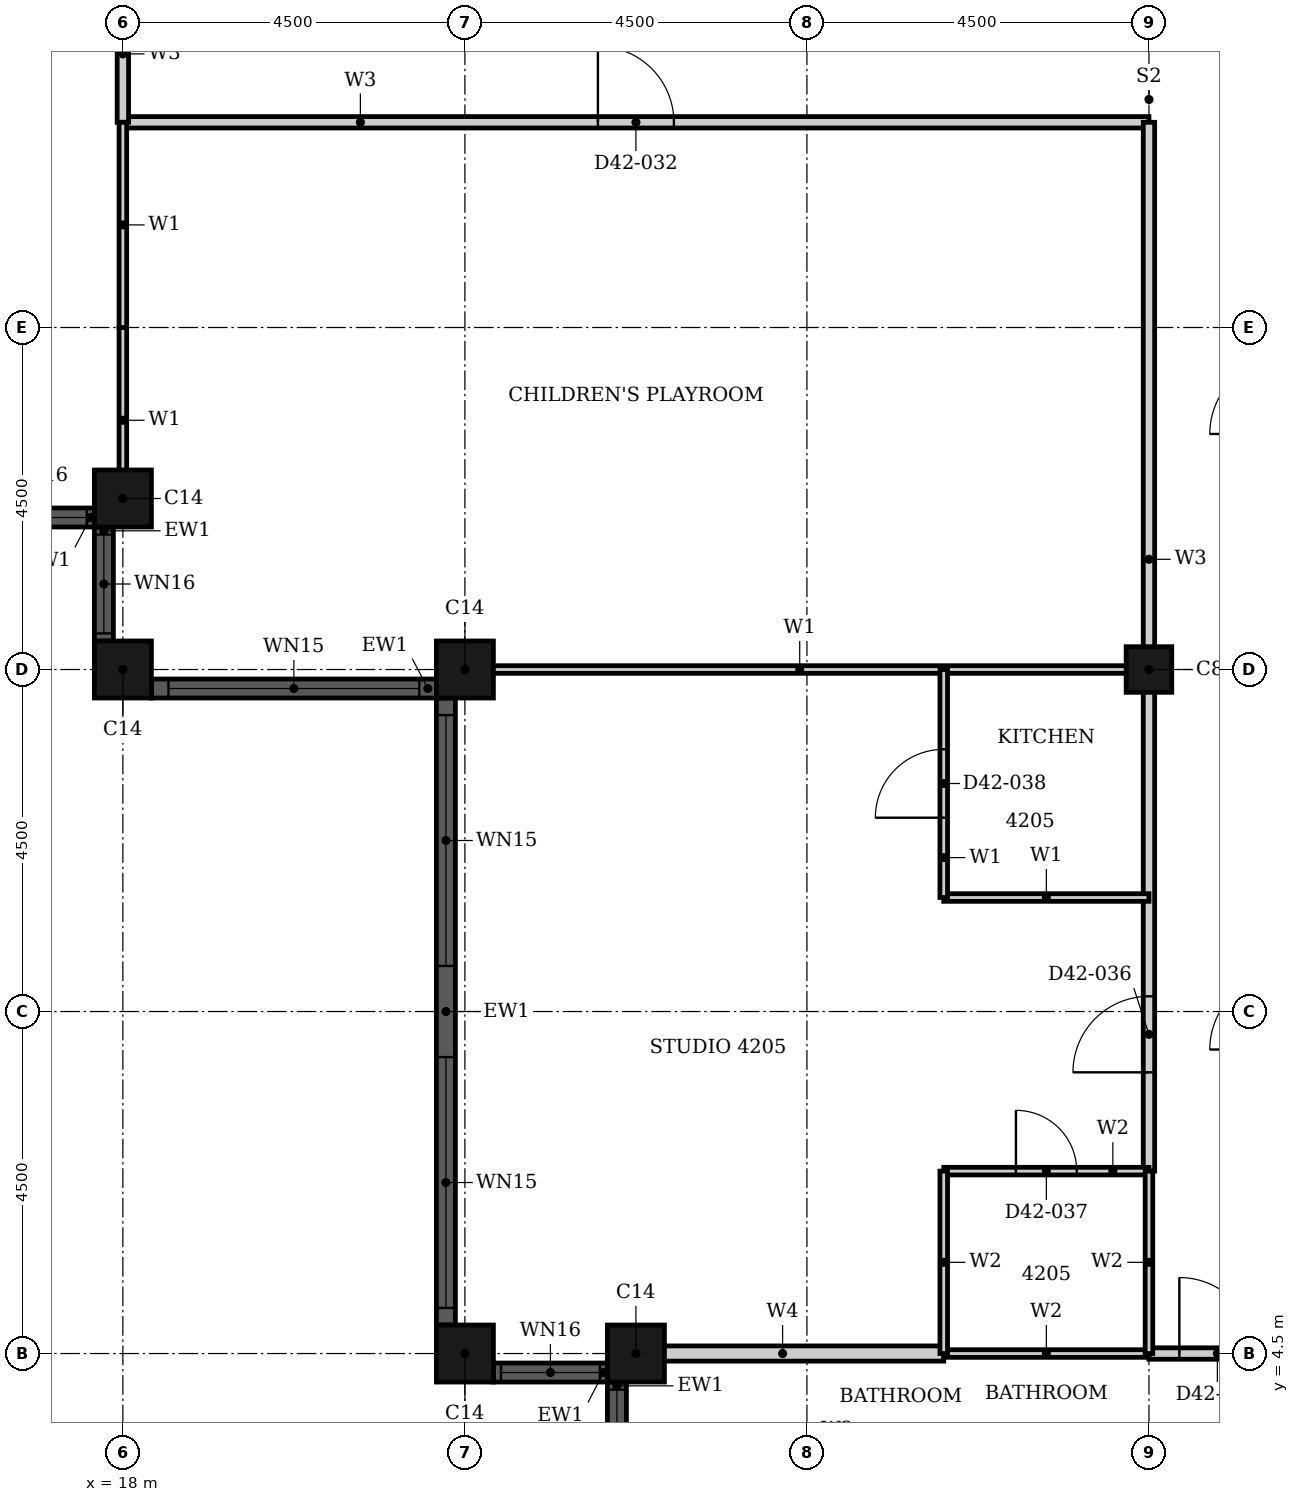
"""IFC4 building model, lengths in metres.
Left out: names, types, materials, properties, quantities, classifications, styles, units other than length and angle.
Written with IfcOpenShell. Run it as: python <this file> out.ifc"""

import sys

from ifc_helpers import new_model, si_unit, direction, frame, frame_2d, origin, origin_2d, place, context, subcontext, project, spatial, rectangle, hollow_rectangle, extrude, element, fill, save


model = new_model("IFC4")
c1 = context("Model", 3, precision=1e-05, world=origin(), true_north=direction((0.0, 1.0)))
c2 = subcontext(c1, "Body", "Model", "MODEL_VIEW")
j1 = project(units=[si_unit("LENGTHUNIT", "METRE"), si_unit("PLANEANGLEUNIT", "RADIAN")], contexts=[c1])
p1 = place(None, origin())
s1 = spatial("IfcSite", under=j1, at=p1, CompositionType="ELEMENT")
p2 = place(p1, origin())
s2 = spatial("IfcBuilding", under=s1, at=p2, CompositionType="ELEMENT")
p3 = place(p2, frame((0.0, 0.0, 169.1)))
s3 = spatial("IfcBuildingStorey", under=s2, at=p3, CompositionType="ELEMENT", Elevation=169.1)
for number, where, z_axis, x_axis in (
    (1, (22.5, 4.5, 0.0), (0.0, 0.0, 1.0), (1.0, 0.0, 0.0)),
    (2, (24.75, 4.5, 0.0), (0.0, 0.0, 1.0), (1.0, 0.0, 0.0)),
    (3, (18.0, 15.75, 0.0), (0.0, 0.0, 1.0), (1.0, 0.0, 0.0)),
    (4, (18.0, 13.5, 0.0), (0.0, 0.0, 1.0), (1.0, 0.0, 0.0)),
    (5, (22.5, 13.5, 0.0), (0.0, 0.0, 1.0), (1.0, 0.0, 0.0)),
):
    element("IfcColumn", number, at=place(p3, frame(where, z_axis=z_axis, x_axis=x_axis)), inside=s3, PredefinedType="COLUMN", context=c2, shape_type="SweptSolid", body=[
        extrude(hollow_rectangle(XDim=0.75, YDim=0.75, WallThickness=0.024, at=origin_2d()), origin(), (0.0, 0.0, 1.0), 3.7),
    ])
p4 = place(p3, frame((31.5, 13.5, 0.0), z_axis=(0.0, 0.0, 1.0), x_axis=(1.0, 0.0, 0.0)))
e6 = element("IfcColumn", 6, at=p4, inside=s3, PredefinedType="COLUMN", context=c2, shape_type="SweptSolid", body=[
    extrude(hollow_rectangle(XDim=0.6, YDim=0.6, WallThickness=0.02, at=origin_2d()), origin(), (0.0, 0.0, 1.0), 3.7),
])
p5 = place(p3, frame((22.875, 4.25, 0.0), z_axis=(0.0, 0.0, 1.0), x_axis=(1.0, 0.0, 0.0)))
e7 = element("IfcWall", 7, at=p5, inside=s3, PredefinedType="SOLIDWALL", context=c2, shape_type="SweptSolid", body=[
    extrude(rectangle(XDim=1.5, YDim=0.25, at=frame_2d((0.75, 0.0))), origin(), (0.0, 0.0, 1.0), 3.7),
])
p6 = place(p5, frame((0.1, 0.0, 0.9)))
e8 = element("IfcOpeningElement", 8, at=p6, cuts=e7, PredefinedType="OPENING", context=c2, shape_type="SweptSolid", body=[
    extrude(rectangle(XDim=1.3, YDim=1.85, at=frame_2d((0.65, 0.925))), frame((0.0, 0.135, 0.0), z_axis=(0.0, -1.0, 0.0), x_axis=(1.0, 0.0, 0.0)), (0.0, 0.0, 1.0), 0.27),
])
p7 = place(p3, frame((24.5, 4.125, 0.0), z_axis=(0.0, 0.0, 1.0), x_axis=(0.0, -1.0, 0.0)))
e9 = element("IfcWall", 9, at=p7, inside=s3, PredefinedType="SOLIDWALL", context=c2, shape_type="SweptSolid", body=[
    extrude(rectangle(XDim=1.5, YDim=0.25, at=frame_2d((0.75, 0.0))), origin(), (0.0, 0.0, 1.0), 3.7),
])
p8 = place(p7, frame((0.1, 0.0, 0.9)))
e10 = element("IfcOpeningElement", 10, at=p8, cuts=e9, PredefinedType="OPENING", context=c2, shape_type="SweptSolid", body=[
    extrude(rectangle(XDim=1.3, YDim=1.85, at=frame_2d((0.65, 0.925))), frame((0.0, 0.135, 0.0), z_axis=(0.0, -1.0, 0.0), x_axis=(1.0, 0.0, 0.0)), (0.0, 0.0, 1.0), 0.27),
])
p9 = place(p3, frame((16.125, 15.5, 0.0), z_axis=(0.0, 0.0, 1.0), x_axis=(1.0, 0.0, 0.0)))
e11 = element("IfcWall", 11, at=p9, inside=s3, PredefinedType="SOLIDWALL", context=c2, shape_type="SweptSolid", body=[
    extrude(rectangle(XDim=1.5, YDim=0.25, at=frame_2d((0.75, 0.0))), origin(), (0.0, 0.0, 1.0), 3.7),
])
p10 = place(p9, frame((0.1, 0.0, 0.9)))
e12 = element("IfcOpeningElement", 12, at=p10, cuts=e11, PredefinedType="OPENING", context=c2, shape_type="SweptSolid", body=[
    extrude(rectangle(XDim=1.3, YDim=1.85, at=frame_2d((0.65, 0.925))), frame((0.0, 0.135, 0.0), z_axis=(0.0, -1.0, 0.0), x_axis=(1.0, 0.0, 0.0)), (0.0, 0.0, 1.0), 0.27),
])
p11 = place(p3, frame((17.75, 15.375, 0.0), z_axis=(0.0, 0.0, 1.0), x_axis=(0.0, -1.0, 0.0)))
e13 = element("IfcWall", 13, at=p11, inside=s3, PredefinedType="SOLIDWALL", context=c2, shape_type="SweptSolid", body=[
    extrude(rectangle(XDim=1.5, YDim=0.25, at=frame_2d((0.75, 0.0))), origin(), (0.0, 0.0, 1.0), 3.7),
])
p12 = place(p11, frame((0.1, 0.0, 0.9)))
e14 = element("IfcOpeningElement", 14, at=p12, cuts=e13, PredefinedType="OPENING", context=c2, shape_type="SweptSolid", body=[
    extrude(rectangle(XDim=1.3, YDim=1.85, at=frame_2d((0.65, 0.925))), frame((0.0, 0.135, 0.0), z_axis=(0.0, -1.0, 0.0), x_axis=(1.0, 0.0, 0.0)), (0.0, 0.0, 1.0), 0.27),
])
p13 = place(p3, frame((18.375, 13.25, 0.0), z_axis=(0.0, 0.0, 1.0), x_axis=(1.0, 0.0, 0.0)))
e15 = element("IfcWall", 15, at=p13, inside=s3, PredefinedType="SOLIDWALL", context=c2, shape_type="SweptSolid", body=[
    extrude(rectangle(XDim=3.75, YDim=0.25, at=frame_2d((1.875, 0.0))), origin(), (0.0, 0.0, 1.0), 3.7),
])
p14 = place(p13, frame((0.225, 0.0, 0.45)))
e16 = element("IfcOpeningElement", 16, at=p14, cuts=e15, PredefinedType="OPENING", context=c2, shape_type="SweptSolid", body=[
    extrude(rectangle(XDim=3.3, YDim=2.3, at=frame_2d((1.65, 1.15))), frame((0.0, 0.135, 0.0), z_axis=(0.0, -1.0, 0.0), x_axis=(1.0, 0.0, 0.0)), (0.0, 0.0, 1.0), 0.27),
])
p15 = place(p3, frame((22.25, 13.125, 0.0), z_axis=(0.0, 0.0, 1.0), x_axis=(0.0, -1.0, 0.0)))
e17 = element("IfcWall", 17, at=p15, inside=s3, PredefinedType="SOLIDWALL", context=c2, shape_type="SweptSolid", body=[
    extrude(rectangle(XDim=8.25, YDim=0.25, at=frame_2d((4.125, 0.0))), origin(), (0.0, 0.0, 1.0), 3.7),
])
p16 = place(p15, frame((0.225, 0.0, 0.45)))
e18 = element("IfcOpeningElement", 18, at=p16, cuts=e17, PredefinedType="OPENING", context=c2, shape_type="SweptSolid", body=[
    extrude(rectangle(XDim=3.3, YDim=2.3, at=frame_2d((1.65, 1.15))), frame((0.0, 0.135, 0.0), z_axis=(0.0, -1.0, 0.0), x_axis=(1.0, 0.0, 0.0)), (0.0, 0.0, 1.0), 0.27),
])
p17 = place(p15, frame((4.725, 0.0, 0.45)))
e19 = element("IfcOpeningElement", 19, at=p17, cuts=e17, PredefinedType="OPENING", context=c2, shape_type="SweptSolid", body=[
    extrude(rectangle(XDim=3.3, YDim=2.3, at=frame_2d((1.65, 1.15))), frame((0.0, 0.135, 0.0), z_axis=(0.0, -1.0, 0.0), x_axis=(1.0, 0.0, 0.0)), (0.0, 0.0, 1.0), 0.27),
])
p18 = place(p3, frame((18.0, 20.7, 0.0), z_axis=(0.0, 0.0, 1.0), x_axis=(1.0, 0.0, 0.0)))
e20 = element("IfcWall", 20, at=p18, inside=s3, PredefinedType="PARTITIONING", context=c2, shape_type="SweptSolid", body=[
    extrude(rectangle(XDim=13.5, YDim=0.15, at=frame_2d((6.75, 0.0))), origin(), (0.0, 0.0, 1.0), 3.4),
])
p19 = place(p18, frame((6.25, 0.0, 0.0)))
e21 = element("IfcOpeningElement", 21, at=p19, cuts=e20, PredefinedType="OPENING", context=c2, shape_type="SweptSolid", body=[
    extrude(rectangle(XDim=1.0, YDim=2.1, at=frame_2d((0.5, 1.05))), frame((0.0, 0.085, 0.0), z_axis=(0.0, -1.0, 0.0), x_axis=(1.0, 0.0, 0.0)), (0.0, 0.0, 1.0), 0.17),
])
p20 = place(p3, frame((31.5, 4.5, 0.0), z_axis=(0.0, 0.0, 1.0), x_axis=(1.0, 0.0, 0.0)))
e22 = element("IfcWall", 22, at=p20, inside=s3, PredefinedType="PARTITIONING", context=c2, shape_type="SweptSolid", body=[
    extrude(rectangle(XDim=1.8, YDim=0.15, at=frame_2d((0.9, 0.0))), origin(), (0.0, 0.0, 1.0), 3.4),
])
p21 = place(p20, frame((0.4, 0.0, 0.0)))
e23 = element("IfcOpeningElement", 23, at=p21, cuts=e22, PredefinedType="OPENING", context=c2, shape_type="SweptSolid", body=[
    extrude(rectangle(XDim=1.0, YDim=2.2, at=frame_2d((0.5, 1.1))), frame((0.0, 0.085, 0.0), z_axis=(0.0, -1.0, 0.0), x_axis=(1.0, 0.0, 0.0)), (0.0, 0.0, 1.0), 0.17),
])
p22 = place(p3, frame((18.0, 20.7, 0.0), z_axis=(0.0, 0.0, 1.0), x_axis=(0.0, 1.0, 0.0)))
e24 = element("IfcWall", 24, at=p22, inside=s3, PredefinedType="PARTITIONING", context=c2, shape_type="SweptSolid", body=[
    extrude(rectangle(XDim=1.8, YDim=0.15, at=frame_2d((0.9, 0.0))), origin(), (0.0, 0.0, 1.0), 3.4),
])
p23 = place(p3, frame((31.5, 6.9, 0.0), z_axis=(0.0, 0.0, 1.0), x_axis=(0.0, 1.0, 0.0)))
e25 = element("IfcWall", 25, at=p23, inside=s3, PredefinedType="PARTITIONING", context=c2, shape_type="SweptSolid", body=[
    extrude(rectangle(XDim=13.8, YDim=0.15, at=frame_2d((6.9, 0.0))), origin(), (0.0, 0.0, 1.0), 2.68),
])
p24 = place(p23, frame((1.3, 0.0, 0.0)))
e26 = element("IfcOpeningElement", 26, at=p24, cuts=e25, PredefinedType="OPENING", context=c2, shape_type="SweptSolid", body=[
    extrude(rectangle(XDim=1.0, YDim=2.2, at=frame_2d((0.5, 1.1))), frame((0.0, 0.085, 0.0), z_axis=(0.0, -1.0, 0.0), x_axis=(1.0, 0.0, 0.0)), (0.0, 0.0, 1.0), 0.17),
])
p25 = place(p3, frame((28.8, 10.5, 0.0), z_axis=(0.0, 0.0, 1.0), x_axis=(1.0, 0.0, 0.0)))
e27 = element("IfcWall", 27, at=p25, inside=s3, PredefinedType="PARTITIONING", context=c2, shape_type="SweptSolid", body=[
    extrude(rectangle(XDim=2.7, YDim=0.1, at=frame_2d((1.35, 0.0))), origin(), (0.0, 0.0, 1.0), 3.4),
])
p26 = place(p3, frame((22.31, 13.5, 0.0), z_axis=(0.0, 0.0, 1.0), x_axis=(1.0, 0.0, 0.0)))
e28 = element("IfcWall", 28, at=p26, inside=s3, PredefinedType="PARTITIONING", context=c2, shape_type="SweptSolid", body=[
    extrude(rectangle(XDim=9.19, YDim=0.1, at=frame_2d((4.595, 0.0))), origin(), (0.0, 0.0, 1.0), 2.48),
])
p27 = place(p3, frame((18.0, 15.56, 0.0), z_axis=(0.0, 0.0, 1.0), x_axis=(0.0, 1.0, 0.0)))
e29 = element("IfcWall", 29, at=p27, inside=s3, PredefinedType="PARTITIONING", context=c2, shape_type="SweptSolid", body=[
    extrude(rectangle(XDim=2.439, YDim=0.1, at=frame_2d((1.219, 0.0))), origin(), (0.0, 0.0, 1.0), 3.4),
])
p28 = place(p3, frame((18.0, 18.0, 0.0), z_axis=(0.0, 0.0, 1.0), x_axis=(0.0, 1.0, 0.0)))
e30 = element("IfcWall", 30, at=p28, inside=s3, PredefinedType="PARTITIONING", context=c2, shape_type="SweptSolid", body=[
    extrude(rectangle(XDim=2.7, YDim=0.1, at=frame_2d((1.35, 0.0))), origin(), (0.0, 0.0, 1.0), 3.4),
])
p29 = place(p3, frame((28.8, 10.5, 0.0), z_axis=(0.0, 0.0, 1.0), x_axis=(0.0, 1.0, 0.0)))
e31 = element("IfcWall", 31, at=p29, inside=s3, PredefinedType="PARTITIONING", context=c2, shape_type="SweptSolid", body=[
    extrude(rectangle(XDim=3.0, YDim=0.1, at=frame_2d((1.5, 0.0))), origin(), (0.0, 0.0, 1.0), 3.4),
])
p30 = place(p29, frame((1.05, 0.0, 0.0)))
e32 = element("IfcOpeningElement", 32, at=p30, cuts=e31, PredefinedType="OPENING", context=c2, shape_type="SweptSolid", body=[
    extrude(rectangle(XDim=0.9, YDim=2.1, at=frame_2d((0.45, 1.05))), frame((0.0, 0.06, 0.0), z_axis=(0.0, -1.0, 0.0), x_axis=(1.0, 0.0, 0.0)), (0.0, 0.0, 1.0), 0.12),
])
p31 = place(p3, frame((24.56, 4.5, 0.0), z_axis=(0.0, 0.0, 1.0), x_axis=(1.0, 0.0, 0.0)))
e33 = element("IfcWall", 33, at=p31, inside=s3, PredefinedType="PARTITIONING", context=c2, shape_type="SweptSolid", body=[
    extrude(rectangle(XDim=4.24, YDim=0.2, at=frame_2d((2.12, 0.0))), origin(), (0.0, 0.0, 1.0), 3.4),
])
p32 = place(p3, frame((28.8, 4.5, 0.0), z_axis=(0.0, 0.0, 1.0), x_axis=(1.0, 0.0, 0.0)))
e34 = element("IfcWall", 34, at=p32, inside=s3, PredefinedType="PARTITIONING", context=c2, shape_type="SweptSolid", body=[
    extrude(rectangle(XDim=2.7, YDim=0.1, at=frame_2d((1.35, 0.0))), origin(), (0.0, 0.0, 1.0), 3.4),
])
p33 = place(p3, frame((28.8, 6.9, 0.0), z_axis=(0.0, 0.0, 1.0), x_axis=(1.0, 0.0, 0.0)))
e35 = element("IfcWall", 35, at=p33, inside=s3, PredefinedType="PARTITIONING", context=c2, shape_type="SweptSolid", body=[
    extrude(rectangle(XDim=2.7, YDim=0.1, at=frame_2d((1.35, 0.0))), origin(), (0.0, 0.0, 1.0), 3.4),
])
p34 = place(p33, frame((0.95, 0.0, 0.0)))
e36 = element("IfcOpeningElement", 36, at=p34, cuts=e35, PredefinedType="OPENING", context=c2, shape_type="SweptSolid", body=[
    extrude(rectangle(XDim=0.8, YDim=2.1, at=frame_2d((0.4, 1.05))), frame((0.0, 0.06, 0.0), z_axis=(0.0, -1.0, 0.0), x_axis=(1.0, 0.0, 0.0)), (0.0, 0.0, 1.0), 0.12),
])
p35 = place(p3, frame((28.8, 4.5, 0.0), z_axis=(0.0, 0.0, 1.0), x_axis=(0.0, 1.0, 0.0)))
e37 = element("IfcWall", 37, at=p35, inside=s3, PredefinedType="PARTITIONING", context=c2, shape_type="SweptSolid", body=[
    extrude(rectangle(XDim=2.4, YDim=0.1, at=frame_2d((1.2, 0.0))), origin(), (0.0, 0.0, 1.0), 3.4),
])
p36 = place(p3, frame((31.5, 4.5, 0.0), z_axis=(0.0, 0.0, 1.0), x_axis=(0.0, 1.0, 0.0)))
e38 = element("IfcWall", 38, at=p36, inside=s3, PredefinedType="PARTITIONING", context=c2, shape_type="SweptSolid", body=[
    extrude(rectangle(XDim=2.4, YDim=0.1, at=frame_2d((1.2, 0.0))), origin(), (0.0, 0.0, 1.0), 2.68),
])
p37 = place(p6, origin())
e39 = element("IfcWindow", 39, at=p37, inside=s3, PartitioningType="SINGLE_PANEL", PredefinedType="WINDOW", context=c2, shape_type="SweptSolid", body=[
    extrude(rectangle(XDim=1.3, YDim=1.85, at=frame_2d((0.65, 0.925))), frame((0.0, 0.03, 0.0), z_axis=(0.0, -1.0, 0.0), x_axis=(1.0, 0.0, 0.0)), (0.0, 0.0, 1.0), 0.06),
])
fill(e8, e39)
p38 = place(p8, origin())
e40 = element("IfcWindow", 40, at=p38, inside=s3, PartitioningType="SINGLE_PANEL", PredefinedType="WINDOW", context=c2, shape_type="SweptSolid", body=[
    extrude(rectangle(XDim=1.3, YDim=1.85, at=frame_2d((0.65, 0.925))), frame((0.0, 0.03, 0.0), z_axis=(0.0, -1.0, 0.0), x_axis=(1.0, 0.0, 0.0)), (0.0, 0.0, 1.0), 0.06),
])
fill(e10, e40)
p39 = place(p10, origin())
e41 = element("IfcWindow", 41, at=p39, inside=s3, PartitioningType="SINGLE_PANEL", PredefinedType="WINDOW", context=c2, shape_type="SweptSolid", body=[
    extrude(rectangle(XDim=1.3, YDim=1.85, at=frame_2d((0.65, 0.925))), frame((0.0, 0.03, 0.0), z_axis=(0.0, -1.0, 0.0), x_axis=(1.0, 0.0, 0.0)), (0.0, 0.0, 1.0), 0.06),
])
fill(e12, e41)
p40 = place(p12, origin())
e42 = element("IfcWindow", 42, at=p40, inside=s3, PartitioningType="SINGLE_PANEL", PredefinedType="WINDOW", context=c2, shape_type="SweptSolid", body=[
    extrude(rectangle(XDim=1.3, YDim=1.85, at=frame_2d((0.65, 0.925))), frame((0.0, 0.03, 0.0), z_axis=(0.0, -1.0, 0.0), x_axis=(1.0, 0.0, 0.0)), (0.0, 0.0, 1.0), 0.06),
])
fill(e14, e42)
p41 = place(p14, origin())
e43 = element("IfcWindow", 43, at=p41, inside=s3, PartitioningType="SINGLE_PANEL", PredefinedType="WINDOW", context=c2, shape_type="SweptSolid", body=[
    extrude(rectangle(XDim=3.3, YDim=2.3, at=frame_2d((1.65, 1.15))), frame((0.0, 0.03, 0.0), z_axis=(0.0, -1.0, 0.0), x_axis=(1.0, 0.0, 0.0)), (0.0, 0.0, 1.0), 0.06),
])
fill(e16, e43)
p42 = place(p16, origin())
e44 = element("IfcWindow", 44, at=p42, inside=s3, PartitioningType="SINGLE_PANEL", PredefinedType="WINDOW", context=c2, shape_type="SweptSolid", body=[
    extrude(rectangle(XDim=3.3, YDim=2.3, at=frame_2d((1.65, 1.15))), frame((0.0, 0.03, 0.0), z_axis=(0.0, -1.0, 0.0), x_axis=(1.0, 0.0, 0.0)), (0.0, 0.0, 1.0), 0.06),
])
fill(e18, e44)
p43 = place(p17, origin())
e45 = element("IfcWindow", 45, at=p43, inside=s3, PartitioningType="SINGLE_PANEL", PredefinedType="WINDOW", context=c2, shape_type="SweptSolid", body=[
    extrude(rectangle(XDim=3.3, YDim=2.3, at=frame_2d((1.65, 1.15))), frame((0.0, 0.03, 0.0), z_axis=(0.0, -1.0, 0.0), x_axis=(1.0, 0.0, 0.0)), (0.0, 0.0, 1.0), 0.06),
])
fill(e19, e45)
p44 = place(p19, origin())
e46 = element("IfcDoor", 46, at=p44, inside=s3, OperationType="SINGLE_SWING_RIGHT", PredefinedType="DOOR", context=c2, shape_type="SweptSolid", body=[
    extrude(rectangle(XDim=1.0, YDim=2.1, at=frame_2d((0.5, 1.05))), frame((0.0, 0.025, 0.0), z_axis=(0.0, -1.0, 0.0), x_axis=(1.0, 0.0, 0.0)), (0.0, 0.0, 1.0), 0.05),
])
fill(e21, e46)
p45 = place(p24, origin())
e47 = element("IfcDoor", 47, at=p45, inside=s3, OperationType="SINGLE_SWING_LEFT", PredefinedType="DOOR", context=c2, shape_type="SweptSolid", body=[
    extrude(rectangle(XDim=1.0, YDim=2.2, at=frame_2d((0.5, 1.1))), frame((0.0, 0.025, 0.0), z_axis=(0.0, -1.0, 0.0), x_axis=(1.0, 0.0, 0.0)), (0.0, 0.0, 1.0), 0.05),
])
fill(e26, e47)
p46 = place(p34, origin())
e48 = element("IfcDoor", 48, at=p46, inside=s3, OperationType="SINGLE_SWING_LEFT", PredefinedType="DOOR", context=c2, shape_type="SweptSolid", body=[
    extrude(rectangle(XDim=0.8, YDim=2.1, at=frame_2d((0.4, 1.05))), frame((0.0, 0.025, 0.0), z_axis=(0.0, -1.0, 0.0), x_axis=(1.0, 0.0, 0.0)), (0.0, 0.0, 1.0), 0.05),
])
fill(e36, e48)
p47 = place(p30, origin())
e49 = element("IfcDoor", 49, at=p47, inside=s3, OperationType="SINGLE_SWING_LEFT", PredefinedType="DOOR", context=c2, shape_type="SweptSolid", body=[
    extrude(rectangle(XDim=0.9, YDim=2.1, at=frame_2d((0.45, 1.05))), frame((0.0, 0.025, 0.0), z_axis=(0.0, -1.0, 0.0), x_axis=(1.0, 0.0, 0.0)), (0.0, 0.0, 1.0), 0.05),
])
fill(e32, e49)
p48 = place(p21, origin())
e50 = element("IfcDoor", 50, at=p48, inside=s3, OperationType="SINGLE_SWING_RIGHT", PredefinedType="DOOR", context=c2, shape_type="SweptSolid", body=[
    extrude(rectangle(XDim=1.0, YDim=2.2, at=frame_2d((0.5, 1.1))), frame((0.0, 0.025, 0.0), z_axis=(0.0, -1.0, 0.0), x_axis=(1.0, 0.0, 0.0)), (0.0, 0.0, 1.0), 0.05),
])
fill(e23, e50)
save(model, sys.argv[1])
